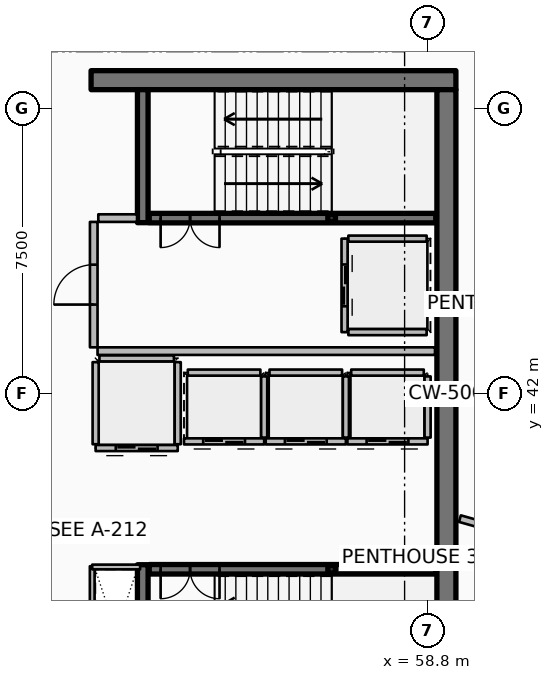
"""IFC4 building model, lengths in metres.
Left out: names, types, materials, properties, quantities, classifications, styles, units other than length and angle.
Written with IfcOpenShell. Run it as: python <this file> out.ifc"""

import sys

from ifc_helpers import new_model, si_unit, direction, frame, frame_2d, origin, origin_2d, place, context, subcontext, project, spatial, rectangle, hollow_rectangle, extrude, element, fill, save


model = new_model("IFC4")
c1 = context("Model", 3, precision=1e-05, world=origin(), true_north=direction((0.0, 1.0)))
c2 = subcontext(c1, "Body", "Model", "MODEL_VIEW")
j1 = project(units=[si_unit("LENGTHUNIT", "METRE"), si_unit("PLANEANGLEUNIT", "RADIAN")], contexts=[c1])
p1 = place(None, origin())
s1 = spatial("IfcSite", under=j1, at=p1, CompositionType="ELEMENT")
p2 = place(p1, origin())
s2 = spatial("IfcBuilding", under=s1, at=p2, CompositionType="ELEMENT")
p3 = place(p2, frame((0.0, 0.0, 330.5)))
s3 = spatial("IfcBuildingStorey", under=s2, at=p3, CompositionType="ELEMENT", Elevation=330.5)
p4 = place(p3, frame((49.95, 50.25, 0.0), z_axis=(0.0, 0.0, 1.0), x_axis=(1.0, 0.0, 0.0)))
e1 = element("IfcWall", 1, at=p4, inside=s3, PredefinedType="SHEAR", context=c2, shape_type="SweptSolid", body=[
    extrude(rectangle(XDim=9.6, YDim=0.5, at=frame_2d((4.8, 0.0))), origin(), (0.0, 0.0, 1.0), 4.2),
])
p5 = place(p3, frame((59.3, 34.0, 0.0), z_axis=(0.0, 0.0, 1.0), x_axis=(0.0, 1.0, 0.0)))
e2 = element("IfcWall", 2, at=p5, inside=s3, PredefinedType="SHEAR", context=c2, shape_type="SweptSolid", body=[
    extrude(rectangle(XDim=16.0, YDim=0.5, at=frame_2d((8.0, 0.0))), origin(), (0.0, 0.0, 1.0), 4.2),
])
for number, where, z_axis, x_axis in (
    (3, (51.31, 46.5, 0.0), (0.0, 0.0, 1.0), (0.0, 1.0, 0.0)),
    (4, (51.31, 34.0, 0.0), (0.0, 0.0, 1.0), (0.0, 1.0, 0.0)),
):
    element("IfcWall", number, at=place(p3, frame(where, z_axis=z_axis, x_axis=x_axis)), inside=s3, PredefinedType="SHEAR", context=c2, shape_type="SweptSolid", body=[
        extrude(rectangle(XDim=3.5, YDim=0.28, at=frame_2d((1.75, 0.0))), origin(), (0.0, 0.0, 1.0), 4.2),
    ])
for number, where, z_axis, x_axis in (
    (5, (56.28, 46.62, 0.0), (0.0, 0.0, 1.0), (1.0, 0.0, 0.0)),
    (6, (56.28, 37.38, 0.0), (0.0, 0.0, 1.0), (1.0, 0.0, 0.0)),
):
    element("IfcColumn", number, at=place(p3, frame(where, z_axis=z_axis, x_axis=x_axis)), inside=s3, PredefinedType="COLUMN", context=c2, shape_type="SweptSolid", body=[
        extrude(hollow_rectangle(XDim=0.2, YDim=0.2, WallThickness=0.01, InnerFilletRadius=0.01, OuterFilletRadius=0.02, at=origin_2d()), origin(), (0.0, 0.0, 1.0), 1.895),
    ])
p6 = place(p3, frame((51.48, 46.62, 0.0), z_axis=(0.0, 0.0, 1.0), x_axis=(1.0, 0.0, 0.0)))
e7 = element("IfcWall", 7, at=p6, inside=s3, PredefinedType="SOLIDWALL", context=c2, shape_type="SweptSolid", body=[
    extrude(rectangle(XDim=7.54, YDim=0.25, at=frame_2d((3.77, 0.0))), origin(), (0.0, 0.0, 1.0), 3.94),
])
p7 = place(p6, frame((0.3, 0.0, 0.0)))
e8 = element("IfcOpeningElement", 8, at=p7, cuts=e7, PredefinedType="OPENING", context=c2, shape_type="SweptSolid", body=[
    extrude(rectangle(XDim=1.55, YDim=2.15, at=frame_2d((0.775, 1.075))), frame((0.0, 0.135, 0.0), z_axis=(0.0, -1.0, 0.0), x_axis=(1.0, 0.0, 0.0)), (0.0, 0.0, 1.0), 0.27),
])
p8 = place(p3, frame((51.48, 37.38, 0.0), z_axis=(0.0, 0.0, 1.0), x_axis=(1.0, 0.0, 0.0)))
e9 = element("IfcWall", 9, at=p8, inside=s3, PredefinedType="SOLIDWALL", context=c2, shape_type="SweptSolid", body=[
    extrude(rectangle(XDim=7.54, YDim=0.25, at=frame_2d((3.77, 0.0))), origin(), (0.0, 0.0, 1.0), 3.94),
])
p9 = place(p8, frame((0.3, 0.0, 0.0)))
e10 = element("IfcOpeningElement", 10, at=p9, cuts=e9, PredefinedType="OPENING", context=c2, shape_type="SweptSolid", body=[
    extrude(rectangle(XDim=1.55, YDim=2.15, at=frame_2d((0.775, 1.075))), frame((0.0, 0.135, 0.0), z_axis=(0.0, -1.0, 0.0), x_axis=(1.0, 0.0, 0.0)), (0.0, 0.0, 1.0), 0.27),
])
p10 = place(p3, frame((54.505, 40.745, 0.0), z_axis=(0.0, 0.0, 1.0), x_axis=(-1.0, 0.0, 0.0)))
e11 = element("IfcWall", 11, at=p10, inside=s3, PredefinedType="PARTITIONING", context=c2, shape_type="SweptSolid", body=[
    extrude(rectangle(XDim=2.11, YDim=0.16, at=frame_2d((1.055, 0.0))), origin(), (0.0, 0.0, 1.0), 3.94),
])
p11 = place(p10, frame((0.505, 0.0, 0.0)))
e12 = element("IfcOpeningElement", 12, at=p11, cuts=e11, PredefinedType="OPENING", context=c2, shape_type="SweptSolid", body=[
    extrude(rectangle(XDim=1.1, YDim=2.1, at=frame_2d((0.55, 1.05))), frame((0.0, 0.09, 0.0), z_axis=(0.0, -1.0, 0.0), x_axis=(1.0, 0.0, 0.0)), (0.0, 0.0, 1.0), 0.18),
])
p12 = place(p3, frame((54.505, 40.845, 0.0), z_axis=(0.0, 0.0, 1.0), x_axis=(0.0, 1.0, 0.0)))
e13 = element("IfcWall", 13, at=p12, inside=s3, PredefinedType="PARTITIONING", context=c2, shape_type="SweptSolid", body=[
    extrude(rectangle(XDim=1.61, YDim=0.16, at=frame_2d((0.805, 0.0))), origin(), (0.0, 0.0, 1.0), 3.94),
])
p13 = place(p3, frame((52.495, 42.555, 0.0), z_axis=(0.0, 0.0, 1.0), x_axis=(1.0, 0.0, 0.0)))
e14 = element("IfcWall", 14, at=p13, inside=s3, PredefinedType="PARTITIONING", context=c2, shape_type="SweptSolid", body=[
    extrude(rectangle(XDim=1.91, YDim=0.16, at=frame_2d((0.955, 0.0))), origin(), (0.0, 0.0, 1.0), 3.94),
])
p14 = place(p3, frame((56.655, 40.745, 0.0), z_axis=(0.0, 0.0, 1.0), x_axis=(-1.0, 0.0, 0.0)))
e15 = element("IfcWall", 15, at=p14, inside=s3, PredefinedType="PARTITIONING", context=c2, shape_type="SweptSolid", body=[
    extrude(rectangle(XDim=2.11, YDim=0.16, at=frame_2d((1.055, 0.0))), origin(), (0.0, 0.0, 1.0), 3.94),
])
p15 = place(p14, frame((0.505, 0.0, 0.0)))
e16 = element("IfcOpeningElement", 16, at=p15, cuts=e15, PredefinedType="OPENING", context=c2, shape_type="SweptSolid", body=[
    extrude(rectangle(XDim=1.1, YDim=2.1, at=frame_2d((0.55, 1.05))), frame((0.0, 0.09, 0.0), z_axis=(0.0, -1.0, 0.0), x_axis=(1.0, 0.0, 0.0)), (0.0, 0.0, 1.0), 0.18),
])
p16 = place(p3, frame((56.655, 40.845, 0.0), z_axis=(0.0, 0.0, 1.0), x_axis=(0.0, 1.0, 0.0)))
e17 = element("IfcWall", 17, at=p16, inside=s3, PredefinedType="PARTITIONING", context=c2, shape_type="SweptSolid", body=[
    extrude(rectangle(XDim=1.61, YDim=0.16, at=frame_2d((0.805, 0.0))), origin(), (0.0, 0.0, 1.0), 3.94),
])
p17 = place(p3, frame((54.645, 42.555, 0.0), z_axis=(0.0, 0.0, 1.0), x_axis=(1.0, 0.0, 0.0)))
e18 = element("IfcWall", 18, at=p17, inside=s3, PredefinedType="PARTITIONING", context=c2, shape_type="SweptSolid", body=[
    extrude(rectangle(XDim=1.91, YDim=0.16, at=frame_2d((0.955, 0.0))), origin(), (0.0, 0.0, 1.0), 3.94),
])
p18 = place(p3, frame((58.805, 40.745, 0.0), z_axis=(0.0, 0.0, 1.0), x_axis=(-1.0, 0.0, 0.0)))
e19 = element("IfcWall", 19, at=p18, inside=s3, PredefinedType="PARTITIONING", context=c2, shape_type="SweptSolid", body=[
    extrude(rectangle(XDim=2.11, YDim=0.16, at=frame_2d((1.055, 0.0))), origin(), (0.0, 0.0, 1.0), 3.94),
])
p19 = place(p18, frame((0.505, 0.0, 0.0)))
e20 = element("IfcOpeningElement", 20, at=p19, cuts=e19, PredefinedType="OPENING", context=c2, shape_type="SweptSolid", body=[
    extrude(rectangle(XDim=1.1, YDim=2.1, at=frame_2d((0.55, 1.05))), frame((0.0, 0.09, 0.0), z_axis=(0.0, -1.0, 0.0), x_axis=(1.0, 0.0, 0.0)), (0.0, 0.0, 1.0), 0.18),
])
p20 = place(p3, frame((58.805, 40.845, 0.0), z_axis=(0.0, 0.0, 1.0), x_axis=(0.0, 1.0, 0.0)))
e21 = element("IfcWall", 21, at=p20, inside=s3, PredefinedType="PARTITIONING", context=c2, shape_type="SweptSolid", body=[
    extrude(rectangle(XDim=1.61, YDim=0.16, at=frame_2d((0.805, 0.0))), origin(), (0.0, 0.0, 1.0), 3.94),
])
p21 = place(p3, frame((56.795, 42.555, 0.0), z_axis=(0.0, 0.0, 1.0), x_axis=(1.0, 0.0, 0.0)))
e22 = element("IfcWall", 22, at=p21, inside=s3, PredefinedType="PARTITIONING", context=c2, shape_type="SweptSolid", body=[
    extrude(rectangle(XDim=1.91, YDim=0.16, at=frame_2d((0.955, 0.0))), origin(), (0.0, 0.0, 1.0), 3.94),
])
p22 = place(p3, frame((56.62, 46.08, 0.0), z_axis=(0.0, 0.0, 1.0), x_axis=(0.0, -1.0, 0.0)))
e23 = element("IfcWall", 23, at=p22, inside=s3, PredefinedType="PARTITIONING", context=c2, shape_type="SweptSolid", body=[
    extrude(rectangle(XDim=2.46, YDim=0.16, at=frame_2d((1.23, 0.0))), origin(), (0.0, 0.0, 1.0), 3.94),
])
p23 = place(p22, frame((0.68, 0.0, 0.0)))
e24 = element("IfcOpeningElement", 24, at=p23, cuts=e23, PredefinedType="OPENING", context=c2, shape_type="SweptSolid", body=[
    extrude(rectangle(XDim=1.1, YDim=2.1, at=frame_2d((0.55, 1.05))), frame((0.0, 0.09, 0.0), z_axis=(0.0, -1.0, 0.0), x_axis=(1.0, 0.0, 0.0)), (0.0, 0.0, 1.0), 0.18),
])
for number, where, z_axis, x_axis in (
    (25, (56.72, 46.08, 0.0), (0.0, 0.0, 1.0), (1.0, 0.0, 0.0)),
    (26, (56.72, 43.62, 0.0), (0.0, 0.0, 1.0), (1.0, 0.0, 0.0)),
):
    element("IfcWall", number, at=place(p3, frame(where, z_axis=z_axis, x_axis=x_axis)), inside=s3, PredefinedType="PARTITIONING", context=c2, shape_type="SweptSolid", body=[
        extrude(rectangle(XDim=2.06, YDim=0.16, at=frame_2d((1.03, 0.0))), origin(), (0.0, 0.0, 1.0), 3.94),
    ])
p24 = place(p3, frame((52.23, 40.57, 0.0), z_axis=(0.0, 0.0, 1.0), x_axis=(-1.0, 0.0, 0.0)))
e27 = element("IfcWall", 27, at=p24, inside=s3, PredefinedType="PARTITIONING", context=c2, shape_type="SweptSolid", body=[
    extrude(rectangle(XDim=2.16, YDim=0.16, at=frame_2d((1.08, 0.0))), origin(), (0.0, 0.0, 1.0), 3.94),
])
p25 = place(p24, frame((0.53, 0.0, 0.0)))
e28 = element("IfcOpeningElement", 28, at=p25, cuts=e27, PredefinedType="OPENING", context=c2, shape_type="SweptSolid", body=[
    extrude(rectangle(XDim=1.1, YDim=2.1, at=frame_2d((0.55, 1.05))), frame((0.0, 0.09, 0.0), z_axis=(0.0, -1.0, 0.0), x_axis=(1.0, 0.0, 0.0)), (0.0, 0.0, 1.0), 0.18),
])
for number, where, z_axis, x_axis in (
    (29, (52.23, 40.67, 0.0), (0.0, 0.0, 1.0), (0.0, 1.0, 0.0)),
    (30, (50.07, 40.67, 0.0), (0.0, 0.0, 1.0), (0.0, 1.0, 0.0)),
):
    element("IfcWall", number, at=place(p3, frame(where, z_axis=z_axis, x_axis=x_axis)), inside=s3, PredefinedType="PARTITIONING", context=c2, shape_type="SweptSolid", body=[
        extrude(rectangle(XDim=2.16, YDim=0.16, at=frame_2d((1.08, 0.0))), origin(), (0.0, 0.0, 1.0), 3.94),
    ])
p26 = place(p3, frame((50.17, 42.93, 0.0), z_axis=(0.0, 0.0, 1.0), x_axis=(1.0, 0.0, 0.0)))
e31 = element("IfcWall", 31, at=p26, inside=s3, PredefinedType="PARTITIONING", context=c2, shape_type="SweptSolid", body=[
    extrude(rectangle(XDim=1.96, YDim=0.16, at=frame_2d((0.98, 0.0))), origin(), (0.0, 0.0, 1.0), 3.94),
])
p27 = place(p3, frame((50.12, 43.12, 0.0), z_axis=(0.0, 0.0, 1.0), x_axis=(1.0, 0.0, 0.0)))
e32 = element("IfcWall", 32, at=p27, inside=s3, PredefinedType="PARTITIONING", context=c2, shape_type="SweptSolid", body=[
    extrude(rectangle(XDim=8.88, YDim=0.2, at=frame_2d((4.44, 0.0))), origin(), (0.0, 0.0, 1.0), 3.94),
])
p28 = place(p3, frame((50.14, 46.62, 0.0), z_axis=(0.0, 0.0, 1.0), x_axis=(1.0, 0.0, 0.0)))
e33 = element("IfcWall", 33, at=p28, inside=s3, PredefinedType="PARTITIONING", context=c2, shape_type="SweptSolid", body=[
    extrude(rectangle(XDim=1.02, YDim=0.2, at=frame_2d((0.51, 0.0))), origin(), (0.0, 0.0, 1.0), 3.94),
])
p29 = place(p3, frame((50.02, 43.22, 0.0), z_axis=(0.0, 0.0, 1.0), x_axis=(0.0, 1.0, 0.0)))
e34 = element("IfcWall", 34, at=p29, inside=s3, PredefinedType="PARTITIONING", context=c2, shape_type="SweptSolid", body=[
    extrude(rectangle(XDim=3.3, YDim=0.2, at=frame_2d((1.65, 0.0))), origin(), (0.0, 0.0, 1.0), 3.94),
])
p30 = place(p29, frame((1.125, 0.0, 0.0)))
e35 = element("IfcOpeningElement", 35, at=p30, cuts=e34, PredefinedType="OPENING", context=c2, shape_type="SweptSolid", body=[
    extrude(rectangle(XDim=1.05, YDim=2.1, at=frame_2d((0.525, 1.05))), frame((0.0, 0.11, 0.0), z_axis=(0.0, -1.0, 0.0), x_axis=(1.0, 0.0, 0.0)), (0.0, 0.0, 1.0), 0.22),
])
p31 = place(p3, frame((49.98, 34.06, 0.0), z_axis=(0.0, 0.0, 1.0), x_axis=(0.0, 1.0, 0.0)))
e36 = element("IfcWall", 36, at=p31, inside=s3, PredefinedType="PARTITIONING", context=c2, shape_type="SweptSolid", body=[
    extrude(rectangle(XDim=3.4, YDim=0.125, at=frame_2d((1.7, 0.0))), origin(), (0.0, 0.0, 1.0), 3.38),
])
p32 = place(p3, frame((49.98, 37.44, 0.0), z_axis=(0.0, 0.0, 1.0), x_axis=(1.0, 0.0, 0.0)))
e37 = element("IfcWall", 37, at=p32, inside=s3, PredefinedType="PARTITIONING", context=c2, shape_type="SweptSolid", body=[
    extrude(rectangle(XDim=1.26, YDim=0.125, at=frame_2d((0.63, 0.0))), origin(), (0.0, 0.0, 1.0), 3.38),
])
p33 = place(p3, frame((59.656, 38.713, 0.0), z_axis=(0.0, 0.0, 1.0), x_axis=(0.962457020055, -0.271434125613, 0.0)))
e38 = element("IfcWall", 38, at=p33, inside=s3, PredefinedType="PARTITIONING", context=c2, shape_type="SweptSolid", body=[
    extrude(rectangle(XDim=12.916, YDim=0.18, at=frame_2d((6.458, 0.0))), origin(), (0.0, 0.0, 1.0), 3.38),
])
p34 = place(p7, origin())
e39 = element("IfcDoor", 39, at=p34, inside=s3, OperationType="DOUBLE_DOOR_SINGLE_SWING", PredefinedType="DOOR", context=c2, shape_type="SweptSolid", body=[
    extrude(rectangle(XDim=1.55, YDim=2.15, at=frame_2d((0.775, 1.075))), frame((0.0, 0.025, 0.0), z_axis=(0.0, -1.0, 0.0), x_axis=(1.0, 0.0, 0.0)), (0.0, 0.0, 1.0), 0.05),
])
fill(e8, e39)
p35 = place(p9, origin())
e40 = element("IfcDoor", 40, at=p35, inside=s3, OperationType="DOUBLE_DOOR_SINGLE_SWING", PredefinedType="DOOR", context=c2, shape_type="SweptSolid", body=[
    extrude(rectangle(XDim=1.55, YDim=2.15, at=frame_2d((0.775, 1.075))), frame((0.0, 0.025, 0.0), z_axis=(0.0, -1.0, 0.0), x_axis=(1.0, 0.0, 0.0)), (0.0, 0.0, 1.0), 0.05),
])
fill(e10, e40)
p36 = place(p11, origin())
e41 = element("IfcDoor", 41, at=p36, inside=s3, OperationType="DOUBLE_DOOR_SLIDING", PredefinedType="DOOR", context=c2, shape_type="SweptSolid", body=[
    extrude(rectangle(XDim=1.1, YDim=2.1, at=frame_2d((0.55, 1.05))), frame((0.0, 0.025, 0.0), z_axis=(0.0, -1.0, 0.0), x_axis=(1.0, 0.0, 0.0)), (0.0, 0.0, 1.0), 0.05),
])
fill(e12, e41)
p37 = place(p15, origin())
e42 = element("IfcDoor", 42, at=p37, inside=s3, OperationType="DOUBLE_DOOR_SLIDING", PredefinedType="DOOR", context=c2, shape_type="SweptSolid", body=[
    extrude(rectangle(XDim=1.1, YDim=2.1, at=frame_2d((0.55, 1.05))), frame((0.0, 0.025, 0.0), z_axis=(0.0, -1.0, 0.0), x_axis=(1.0, 0.0, 0.0)), (0.0, 0.0, 1.0), 0.05),
])
fill(e16, e42)
p38 = place(p19, origin())
e43 = element("IfcDoor", 43, at=p38, inside=s3, OperationType="DOUBLE_DOOR_SLIDING", PredefinedType="DOOR", context=c2, shape_type="SweptSolid", body=[
    extrude(rectangle(XDim=1.1, YDim=2.1, at=frame_2d((0.55, 1.05))), frame((0.0, 0.025, 0.0), z_axis=(0.0, -1.0, 0.0), x_axis=(1.0, 0.0, 0.0)), (0.0, 0.0, 1.0), 0.05),
])
fill(e20, e43)
p39 = place(p23, origin())
e44 = element("IfcDoor", 44, at=p39, inside=s3, OperationType="DOUBLE_DOOR_SLIDING", PredefinedType="DOOR", context=c2, shape_type="SweptSolid", body=[
    extrude(rectangle(XDim=1.1, YDim=2.1, at=frame_2d((0.55, 1.05))), frame((0.0, 0.025, 0.0), z_axis=(0.0, -1.0, 0.0), x_axis=(1.0, 0.0, 0.0)), (0.0, 0.0, 1.0), 0.05),
])
fill(e24, e44)
p40 = place(p25, origin())
e45 = element("IfcDoor", 45, at=p40, inside=s3, OperationType="DOUBLE_DOOR_SLIDING", PredefinedType="DOOR", context=c2, shape_type="SweptSolid", body=[
    extrude(rectangle(XDim=1.1, YDim=2.1, at=frame_2d((0.55, 1.05))), frame((0.0, 0.025, 0.0), z_axis=(0.0, -1.0, 0.0), x_axis=(1.0, 0.0, 0.0)), (0.0, 0.0, 1.0), 0.05),
])
fill(e28, e45)
p41 = place(p30, origin())
e46 = element("IfcDoor", 46, at=p41, inside=s3, OperationType="SINGLE_SWING_LEFT", PredefinedType="DOOR", context=c2, shape_type="SweptSolid", body=[
    extrude(rectangle(XDim=1.05, YDim=2.1, at=frame_2d((0.525, 1.05))), frame((0.0, 0.025, 0.0), z_axis=(0.0, -1.0, 0.0), x_axis=(1.0, 0.0, 0.0)), (0.0, 0.0, 1.0), 0.05),
])
fill(e35, e46)
save(model, sys.argv[1])
